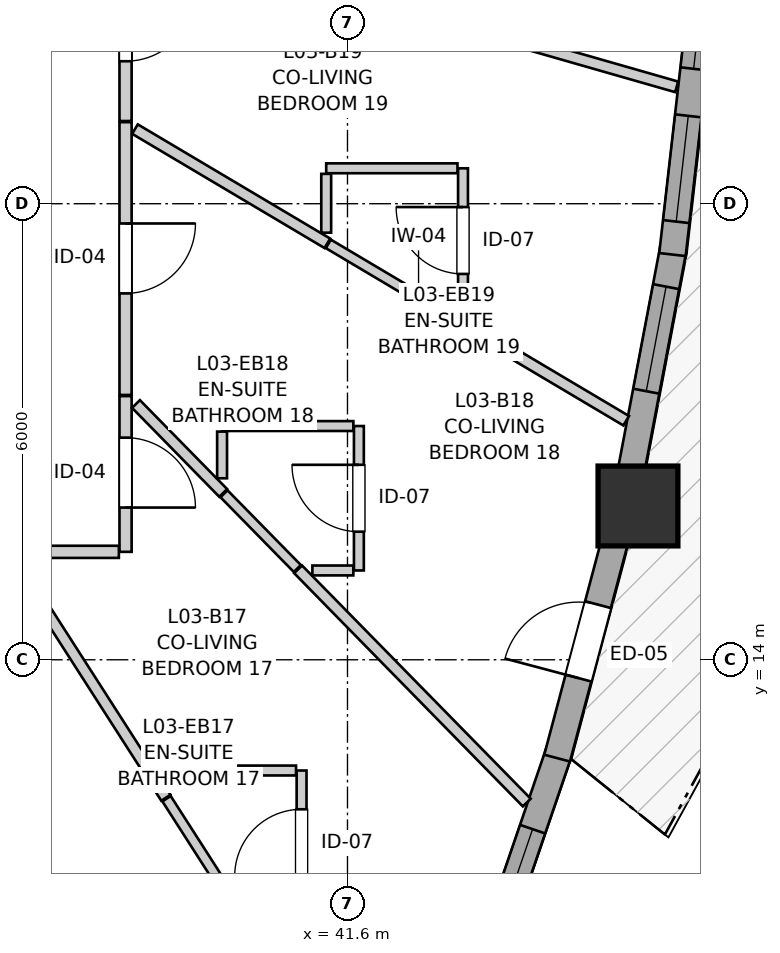
"""IFC4 building model, lengths in metres.
Left out: names, types, materials, properties, quantities, classifications, styles, units other than length and angle.
Written with IfcOpenShell. Run it as: python <this file> out.ifc"""

import sys

from ifc_helpers import new_model, si_unit, direction, frame, frame_2d, origin, origin_2d, place, context, subcontext, project, spatial, rectangle, extrude, source, transform, mapped, element, fill, save


model = new_model("IFC4")
c1 = context("Model", 3, precision=1e-05, world=origin(), true_north=direction((0.0, 1.0)))
c2 = subcontext(c1, "Body", "Model", "MODEL_VIEW")
j1 = project(units=[si_unit("LENGTHUNIT", "METRE"), si_unit("PLANEANGLEUNIT", "RADIAN")], contexts=[c1])
p1 = place(None, origin())
s1 = spatial("IfcSite", under=j1, at=p1, CompositionType="ELEMENT")
p2 = place(p1, origin())
s2 = spatial("IfcBuilding", under=s1, at=p2, CompositionType="ELEMENT")
p3 = place(p2, frame((0.0, 0.0, 14.2)))
s3 = spatial("IfcBuildingStorey", under=s2, at=p3, CompositionType="ELEMENT", Elevation=14.2)
m1 = source(origin(), c2, "Body", "SweptSolid", [
    extrude(rectangle(XDim=1.05, YDim=1.05, at=origin_2d()), origin(), (0.0, 0.0, 1.0), 2.94),
])
p4 = place(p3, frame((45.422, 16.023, 0.0), z_axis=(0.0, 0.0, 1.0), x_axis=(1.0, 0.0, 0.0)))
e1 = element("IfcColumn", 1, at=p4, inside=s3, PredefinedType="COLUMN", context=c2, shape_type="MappedRepresentation", body=[
    mapped(m1, transform((0.0, 0.0, 0.0), x_axis=(1.0, 0.0, 0.0), y_axis=(0.0, 1.0, 0.0), z_axis=(0.0, 0.0, 1.0), scale=1.0)),
])
p5 = place(p3, frame((43.241, 9.448, 0.0), z_axis=(0.0, 0.0, 1.0), x_axis=(0.323599751171, 0.946194060984, 0.0)))
e2 = element("IfcWall", 2, at=p5, inside=s3, PredefinedType="SOLIDWALL", context=c2, shape_type="SweptSolid", body=[
    extrude(rectangle(XDim=3.532, YDim=0.35, at=frame_2d((1.766, 0.0))), origin(), (0.0, 0.0, 1.0), 2.42),
])
p6 = place(p5, frame((0.356, 0.0, 0.82)))
e3 = element("IfcOpeningElement", 3, at=p6, cuts=e2, PredefinedType="OPENING", context=c2, shape_type="SweptSolid", body=[
    extrude(rectangle(XDim=2.1, YDim=1.4, at=frame_2d((1.05, 0.7))), frame((0.0, 0.185, 0.0), z_axis=(0.0, -1.0, 0.0), x_axis=(1.0, 0.0, 0.0)), (0.0, 0.0, 1.0), 0.37),
])
p7 = place(p3, frame((44.358, 12.706, 0.0), z_axis=(0.0, 0.0, 1.0), x_axis=(0.25708907847, 0.966387709841, 0.0)))
e4 = element("IfcWall", 4, at=p7, inside=s3, PredefinedType="SOLIDWALL", context=c2, shape_type="SweptSolid", body=[
    extrude(rectangle(XDim=3.179, YDim=0.35, at=frame_2d((1.59, 0.0))), origin(), (0.0, 0.0, 1.0), 2.42),
])
p8 = place(p7, frame((1.09, 0.0, 0.0)))
e5 = element("IfcOpeningElement", 5, at=p8, cuts=e4, PredefinedType="OPENING", context=c2, shape_type="SweptSolid", body=[
    extrude(rectangle(XDim=1.0, YDim=2.1, at=frame_2d((0.5, 1.05))), frame((0.0, 0.185, 0.0), z_axis=(0.0, -1.0, 0.0), x_axis=(1.0, 0.0, 0.0)), (0.0, 0.0, 1.0), 0.37),
])
p9 = place(p3, frame((45.306, 16.351, 0.0), z_axis=(0.0, 0.0, 1.0), x_axis=(0.186681017514, 0.982420580861, 0.0)))
e6 = element("IfcWall", 6, at=p9, inside=s3, PredefinedType="SOLIDWALL", context=c2, shape_type="SweptSolid", body=[
    extrude(rectangle(XDim=3.123, YDim=0.35, at=frame_2d((1.562, 0.0))), origin(), (0.0, 0.0, 1.0), 2.42),
])
p10 = place(p9, frame((1.204, 0.0, 0.82)))
e7 = element("IfcOpeningElement", 7, at=p10, cuts=e6, PredefinedType="OPENING", context=c2, shape_type="SweptSolid", body=[
    extrude(rectangle(XDim=1.4, YDim=1.35, at=frame_2d((0.7, 0.675))), frame((0.0, 0.185, 0.0), z_axis=(0.0, -1.0, 0.0), x_axis=(1.0, 0.0, 0.0)), (0.0, 0.0, 1.0), 0.37),
])
p11 = place(p3, frame((45.875, 19.331, 0.0), z_axis=(0.0, 0.0, 1.0), x_axis=(0.113329685842, 0.99355743785, 0.0)))
e8 = element("IfcWall", 8, at=p11, inside=s3, PredefinedType="SOLIDWALL", context=c2, shape_type="SweptSolid", body=[
    extrude(rectangle(XDim=3.365, YDim=0.35, at=frame_2d((1.683, 0.0))), origin(), (0.0, 0.0, 1.0), 2.42),
])
p12 = place(p11, frame((0.437, 0.0, 0.82)))
e9 = element("IfcOpeningElement", 9, at=p12, cuts=e8, PredefinedType="OPENING", context=c2, shape_type="SweptSolid", body=[
    extrude(rectangle(XDim=1.4, YDim=1.35, at=frame_2d((0.7, 0.675))), frame((0.0, 0.185, 0.0), z_axis=(0.0, -1.0, 0.0), x_axis=(1.0, 0.0, 0.0)), (0.0, 0.0, 1.0), 0.37),
])
p13 = place(p11, frame((2.459, 0.0, 0.82)))
e10 = element("IfcOpeningElement", 10, at=p13, cuts=e8, PredefinedType="OPENING", context=c2, shape_type="SweptSolid", body=[
    extrude(rectangle(XDim=0.58, YDim=1.35, at=frame_2d((0.29, 0.675))), frame((0.0, 0.185, 0.0), z_axis=(0.0, -1.0, 0.0), x_axis=(1.0, 0.0, 0.0)), (0.0, 0.0, 1.0), 0.37),
])
p14 = place(p3, frame((38.68, 21.073, 0.0), z_axis=(0.0, 0.0, 1.0), x_axis=(0.0, -1.0, 0.0)))
e11 = element("IfcWall", 11, at=p14, inside=s3, PredefinedType="PARTITIONING", context=c2, shape_type="SweptSolid", body=[
    extrude(rectangle(XDim=3.589, YDim=0.16, at=frame_2d((1.794, 0.0))), origin(), (0.0, 0.0, 1.0), 2.94),
])
p15 = place(p14, frame((1.333, 0.0, 0.0)))
e12 = element("IfcOpeningElement", 12, at=p15, cuts=e11, PredefinedType="OPENING", context=c2, shape_type="SweptSolid", body=[
    extrude(rectangle(XDim=0.92, YDim=2.1, at=frame_2d((0.46, 1.05))), frame((0.0, 0.09, 0.0), z_axis=(0.0, -1.0, 0.0), x_axis=(1.0, 0.0, 0.0)), (0.0, 0.0, 1.0), 0.18),
])
p16 = place(p3, frame((38.68, 23.63, 0.0), z_axis=(0.0, 0.0, 1.0), x_axis=(0.0, -1.0, 0.0)))
e13 = element("IfcWall", 13, at=p16, inside=s3, PredefinedType="PARTITIONING", context=c2, shape_type="SweptSolid", body=[
    extrude(rectangle(XDim=2.542, YDim=0.16, at=frame_2d((1.271, 0.0))), origin(), (0.0, 0.0, 1.0), 2.94),
])
p17 = place(p16, frame((0.835, 0.0, 0.0)))
e14 = element("IfcOpeningElement", 14, at=p17, cuts=e13, PredefinedType="OPENING", context=c2, shape_type="SweptSolid", body=[
    extrude(rectangle(XDim=0.92, YDim=2.1, at=frame_2d((0.46, 1.05))), frame((0.0, 0.09, 0.0), z_axis=(0.0, -1.0, 0.0), x_axis=(1.0, 0.0, 0.0)), (0.0, 0.0, 1.0), 0.18),
])
p18 = place(p3, frame((38.68, 17.469, 0.0), z_axis=(0.0, 0.0, 1.0), x_axis=(0.0, -1.0, 0.0)))
e15 = element("IfcWall", 15, at=p18, inside=s3, PredefinedType="PARTITIONING", context=c2, shape_type="SweptSolid", body=[
    extrude(rectangle(XDim=2.049, YDim=0.16, at=frame_2d((1.024, 0.0))), origin(), (0.0, 0.0, 1.0), 2.94),
])
p19 = place(p18, frame((0.546, 0.0, 0.0)))
e16 = element("IfcOpeningElement", 16, at=p19, cuts=e15, PredefinedType="OPENING", context=c2, shape_type="SweptSolid", body=[
    extrude(rectangle(XDim=0.92, YDim=2.1, at=frame_2d((0.46, 1.05))), frame((0.0, 0.09, 0.0), z_axis=(0.0, -1.0, 0.0), x_axis=(1.0, 0.0, 0.0)), (0.0, 0.0, 1.0), 0.18),
])
p20 = place(p3, frame((43.12, 18.566, 0.0), z_axis=(0.0, 0.0, 1.0), x_axis=(0.0, 1.0, 0.0)))
e17 = element("IfcWall", 17, at=p20, inside=s3, PredefinedType="PARTITIONING", context=c2, shape_type="SweptSolid", body=[
    extrude(rectangle(XDim=1.9, YDim=0.13, at=frame_2d((0.95, 0.0))), origin(), (0.0, 0.0, 1.0), 2.94),
])
p21 = place(p20, frame((0.51, 0.0, 0.0)))
e18 = element("IfcOpeningElement", 18, at=p21, cuts=e17, PredefinedType="OPENING", context=c2, shape_type="SweptSolid", body=[
    extrude(rectangle(XDim=0.88, YDim=2.05, at=frame_2d((0.44, 1.025))), frame((0.0, 0.075, 0.0), z_axis=(0.0, -1.0, 0.0), x_axis=(1.0, 0.0, 0.0)), (0.0, 0.0, 1.0), 0.15),
])
p22 = place(p3, frame((40.996, 10.643, 0.0), z_axis=(0.0, 0.0, 1.0), x_axis=(0.0, 1.0, 0.0)))
e19 = element("IfcWall", 19, at=p22, inside=s3, PredefinedType="PARTITIONING", context=c2, shape_type="SweptSolid", body=[
    extrude(rectangle(XDim=1.9, YDim=0.13, at=frame_2d((0.95, 0.0))), origin(), (0.0, 0.0, 1.0), 2.94),
])
p23 = place(p22, frame((0.51, 0.0, 0.0)))
e20 = element("IfcOpeningElement", 20, at=p23, cuts=e19, PredefinedType="OPENING", context=c2, shape_type="SweptSolid", body=[
    extrude(rectangle(XDim=0.88, YDim=2.05, at=frame_2d((0.44, 1.025))), frame((0.0, 0.075, 0.0), z_axis=(0.0, -1.0, 0.0), x_axis=(1.0, 0.0, 0.0)), (0.0, 0.0, 1.0), 0.15),
])
p24 = place(p3, frame((41.75, 15.175, 0.0), z_axis=(0.0, 0.0, 1.0), x_axis=(0.0, 1.0, 0.0)))
e21 = element("IfcWall", 21, at=p24, inside=s3, PredefinedType="PARTITIONING", context=c2, shape_type="SweptSolid", body=[
    extrude(rectangle(XDim=1.9, YDim=0.13, at=frame_2d((0.95, 0.0))), origin(), (0.0, 0.0, 1.0), 2.94),
])
p25 = place(p24, frame((0.51, 0.0, 0.0)))
e22 = element("IfcOpeningElement", 22, at=p25, cuts=e21, PredefinedType="OPENING", context=c2, shape_type="SweptSolid", body=[
    extrude(rectangle(XDim=0.88, YDim=2.05, at=frame_2d((0.44, 1.025))), frame((0.0, 0.075, 0.0), z_axis=(0.0, -1.0, 0.0), x_axis=(1.0, 0.0, 0.0)), (0.0, 0.0, 1.0), 0.15),
])
p26 = place(p3, frame((40.95, 15.19, 0.0), z_axis=(0.0, 0.0, 1.0), x_axis=(0.700142401903, -0.714003233226, 0.0)))
e23 = element("IfcWall", 23, at=p26, inside=s3, PredefinedType="PARTITIONING", context=c2, shape_type="SweptSolid", body=[
    extrude(rectangle(XDim=4.298, YDim=0.145, at=frame_2d((2.149, 0.0))), origin(), (0.0, 0.0, 1.0), 2.94),
])
p27 = place(p3, frame((37.217, 15.294, 0.0), z_axis=(0.0, 0.0, 1.0), x_axis=(0.539878709929, -0.841742822105, 0.0)))
e24 = element("IfcWall", 24, at=p27, inside=s3, PredefinedType="PARTITIONING", context=c2, shape_type="SweptSolid", body=[
    extrude(rectangle(XDim=3.694, YDim=0.145, at=frame_2d((1.847, 0.0))), origin(), (0.0, 0.0, 1.0), 2.94),
])
p28 = place(p3, frame((38.804, 20.981, 0.0), z_axis=(0.0, 0.0, 1.0), x_axis=(0.859905944731, -0.510452511225, 0.0)))
e25 = element("IfcWall", 25, at=p28, inside=s3, PredefinedType="PARTITIONING", context=c2, shape_type="SweptSolid", body=[
    extrude(rectangle(XDim=2.943, YDim=0.145, at=frame_2d((1.472, 0.0))), origin(), (0.0, 0.0, 1.0), 2.94),
])
p29 = place(p3, frame((43.055, 22.361, 0.0), z_axis=(0.0, 0.0, 1.0), x_axis=(0.961351316588, -0.275324619486, 0.0)))
e26 = element("IfcWall", 26, at=p29, inside=s3, PredefinedType="PARTITIONING", context=c2, shape_type="SweptSolid", body=[
    extrude(rectangle(XDim=2.992, YDim=0.145, at=frame_2d((1.496, 0.0))), origin(), (0.0, 0.0, 1.0), 2.94),
])
p30 = place(p3, frame((42.848, 18.581, 0.0), z_axis=(0.0, 0.0, 1.0), x_axis=(0.859872599939, -0.510508679528, 0.0)))
e27 = element("IfcWall", 27, at=p30, inside=s3, PredefinedType="PARTITIONING", context=c2, shape_type="SweptSolid", body=[
    extrude(rectangle(XDim=2.813, YDim=0.145, at=frame_2d((1.407, 0.0))), origin(), (0.0, 0.0, 1.0), 2.94),
])
p31 = place(p3, frame((38.817, 17.365, 0.0), z_axis=(0.0, 0.0, 1.0), x_axis=(0.70029627305, -0.713852316626, 0.0)))
e28 = element("IfcWall", 28, at=p31, inside=s3, PredefinedType="PARTITIONING", context=c2, shape_type="SweptSolid", body=[
    extrude(rectangle(XDim=1.639, YDim=0.145, at=frame_2d((0.819, 0.0))), origin(), (0.0, 0.0, 1.0), 2.94),
])
for number, where, z_axis, x_axis in (
    (29, (39.196, 12.543, 0.0), (0.0, 0.0, 1.0), (1.0, 0.0, 0.0)),
    (30, (39.95, 17.075, 0.0), (0.0, 0.0, 1.0), (1.0, 0.0, 0.0)),
    (31, (41.32, 20.466, 0.0), (0.0, 0.0, 1.0), (1.0, 0.0, 0.0)),
):
    element("IfcWall", number, at=place(p3, frame(where, z_axis=z_axis, x_axis=x_axis)), inside=s3, PredefinedType="PARTITIONING", context=c2, shape_type="SweptSolid", body=[
        extrude(rectangle(XDim=1.727, YDim=0.13, at=frame_2d((0.864, 0.0))), origin(), (0.0, 0.0, 1.0), 2.94),
    ])
p32 = place(p3, frame((39.219, 12.172, 0.0), z_axis=(0.0, 0.0, 1.0), x_axis=(0.539899826285, -0.84172927808, 0.0)))
e32 = element("IfcWall", 32, at=p32, inside=s3, PredefinedType="PARTITIONING", context=c2, shape_type="SweptSolid", body=[
    extrude(rectangle(XDim=1.784, YDim=0.13, at=frame_2d((0.892, 0.0))), origin(), (0.0, 0.0, 1.0), 2.94),
])
p33 = place(p3, frame((41.348, 19.471, 0.0), z_axis=(0.0, 0.0, 1.0), x_axis=(0.859825694404, -0.510587676352, 0.0)))
e33 = element("IfcWall", 33, at=p33, inside=s3, PredefinedType="PARTITIONING", context=c2, shape_type="SweptSolid", body=[
    extrude(rectangle(XDim=1.729, YDim=0.13, at=frame_2d((0.865, 0.0))), origin(), (0.0, 0.0, 1.0), 2.94),
])
p34 = place(p3, frame((37.314, 15.42, 0.0), z_axis=(0.0, 0.0, 1.0), x_axis=(1.0, 0.0, 0.0)))
e34 = element("IfcWall", 34, at=p34, inside=s3, PredefinedType="PARTITIONING", context=c2, shape_type="SweptSolid", body=[
    extrude(rectangle(XDim=1.278, YDim=0.16, at=frame_2d((0.639, 0.0))), origin(), (0.0, 0.0, 1.0), 2.94),
])
p35 = place(p3, frame((39.975, 16.184, 0.0), z_axis=(0.0, 0.0, 1.0), x_axis=(0.700338966049, -0.713810431861, 0.0)))
e35 = element("IfcWall", 35, at=p35, inside=s3, PredefinedType="PARTITIONING", context=c2, shape_type="SweptSolid", body=[
    extrude(rectangle(XDim=1.377, YDim=0.13, at=frame_2d((0.689, 0.0))), origin(), (0.0, 0.0, 1.0), 2.94),
])
p36 = place(p3, frame((41.32, 19.619, 0.0), z_axis=(0.0, 0.0, 1.0), x_axis=(0.0, 1.0, 0.0)))
e36 = element("IfcWall", 36, at=p36, inside=s3, PredefinedType="PARTITIONING", context=c2, shape_type="SweptSolid", body=[
    extrude(rectangle(XDim=0.774, YDim=0.13, at=frame_2d((0.387, 0.0))), origin(), (0.0, 0.0, 1.0), 2.94),
])
p37 = place(p3, frame((39.95, 16.388, 0.0), z_axis=(0.0, 0.0, 1.0), x_axis=(0.0, 1.0, 0.0)))
e37 = element("IfcWall", 37, at=p37, inside=s3, PredefinedType="PARTITIONING", context=c2, shape_type="SweptSolid", body=[
    extrude(rectangle(XDim=0.614, YDim=0.13, at=frame_2d((0.307, 0.0))), origin(), (0.0, 0.0, 1.0), 2.94),
])
p38 = place(p3, frame((41.138, 15.175, 0.0), z_axis=(0.0, 0.0, 1.0), x_axis=(1.0, 0.0, 0.0)))
e38 = element("IfcWall", 38, at=p38, inside=s3, PredefinedType="PARTITIONING", context=c2, shape_type="SweptSolid", body=[
    extrude(rectangle(XDim=0.539, YDim=0.13, at=frame_2d((0.27, 0.0))), origin(), (0.0, 0.0, 1.0), 2.94),
])
m2 = source(origin(), c2, "Body", "SweptSolid", [
    extrude(rectangle(XDim=2.1, YDim=1.4, at=frame_2d((1.05, 0.7))), frame((0.0, 0.03, 0.0), z_axis=(0.0, -1.0, 0.0), x_axis=(1.0, 0.0, 0.0)), (0.0, 0.0, 1.0), 0.06),
])
p39 = place(p6, origin())
e39 = element("IfcWindow", 39, at=p39, inside=s3, PartitioningType="SINGLE_PANEL", PredefinedType="WINDOW", context=c2, shape_type="MappedRepresentation", body=[
    mapped(m2, transform((0.0, 0.0, 0.0), x_axis=(1.0, 0.0, 0.0), y_axis=(0.0, 1.0, 0.0), z_axis=(0.0, 0.0, 1.0), scale=1.0)),
])
fill(e3, e39)
m3 = source(origin(), c2, "Body", "SweptSolid", [
    extrude(rectangle(XDim=1.4, YDim=1.35, at=frame_2d((0.7, 0.675))), frame((0.0, 0.03, 0.0), z_axis=(0.0, -1.0, 0.0), x_axis=(1.0, 0.0, 0.0)), (0.0, 0.0, 1.0), 0.06),
])
p40 = place(p10, origin())
e40 = element("IfcWindow", 40, at=p40, inside=s3, PartitioningType="SINGLE_PANEL", PredefinedType="WINDOW", context=c2, shape_type="MappedRepresentation", body=[
    mapped(m3, transform((0.0, 0.0, 0.0), x_axis=(1.0, 0.0, 0.0), y_axis=(0.0, 1.0, 0.0), z_axis=(0.0, 0.0, 1.0), scale=1.0)),
])
fill(e7, e40)
p41 = place(p12, origin())
e41 = element("IfcWindow", 41, at=p41, inside=s3, PartitioningType="SINGLE_PANEL", PredefinedType="WINDOW", context=c2, shape_type="MappedRepresentation", body=[
    mapped(m3, transform((0.0, 0.0, 0.0), x_axis=(1.0, 0.0, 0.0), y_axis=(0.0, 1.0, 0.0), z_axis=(0.0, 0.0, 1.0), scale=1.0)),
])
fill(e9, e41)
m4 = source(origin(), c2, "Body", "SweptSolid", [
    extrude(rectangle(XDim=0.58, YDim=1.35, at=frame_2d((0.29, 0.675))), frame((0.0, 0.03, 0.0), z_axis=(0.0, -1.0, 0.0), x_axis=(1.0, 0.0, 0.0)), (0.0, 0.0, 1.0), 0.06),
])
p42 = place(p13, origin())
e42 = element("IfcWindow", 42, at=p42, inside=s3, PartitioningType="SINGLE_PANEL", PredefinedType="WINDOW", context=c2, shape_type="MappedRepresentation", body=[
    mapped(m4, transform((0.0, 0.0, 0.0), x_axis=(1.0, 0.0, 0.0), y_axis=(0.0, 1.0, 0.0), z_axis=(0.0, 0.0, 1.0), scale=1.0)),
])
fill(e10, e42)
m5 = source(origin(), c2, "Body", "SweptSolid", [
    extrude(rectangle(XDim=1.0, YDim=2.1, at=frame_2d((0.5, 1.05))), frame((0.0, 0.025, 0.0), z_axis=(0.0, -1.0, 0.0), x_axis=(1.0, 0.0, 0.0)), (0.0, 0.0, 1.0), 0.05),
])
p43 = place(p8, origin())
e43 = element("IfcDoor", 43, at=p43, inside=s3, OperationType="SINGLE_SWING_LEFT", PredefinedType="DOOR", context=c2, shape_type="MappedRepresentation", body=[
    mapped(m5, transform((0.0, 0.0, 0.0), x_axis=(1.0, 0.0, 0.0), y_axis=(0.0, 1.0, 0.0), z_axis=(0.0, 0.0, 1.0), scale=1.0)),
])
fill(e5, e43)
m6 = source(origin(), c2, "Body", "SweptSolid", [
    extrude(rectangle(XDim=0.92, YDim=2.1, at=frame_2d((0.46, 1.05))), frame((0.0, 0.025, 0.0), z_axis=(0.0, -1.0, 0.0), x_axis=(1.0, 0.0, 0.0)), (0.0, 0.0, 1.0), 0.05),
])
p44 = place(p15, origin())
e44 = element("IfcDoor", 44, at=p44, inside=s3, OperationType="SINGLE_SWING_LEFT", PredefinedType="DOOR", context=c2, shape_type="MappedRepresentation", body=[
    mapped(m6, transform((0.0, 0.0, 0.0), x_axis=(1.0, 0.0, 0.0), y_axis=(0.0, 1.0, 0.0), z_axis=(0.0, 0.0, 1.0), scale=1.0)),
])
fill(e12, e44)
p45 = place(p17, origin())
e45 = element("IfcDoor", 45, at=p45, inside=s3, OperationType="SINGLE_SWING_LEFT", PredefinedType="DOOR", context=c2, shape_type="MappedRepresentation", body=[
    mapped(m6, transform((0.0, 0.0, 0.0), x_axis=(1.0, 0.0, 0.0), y_axis=(0.0, 1.0, 0.0), z_axis=(0.0, 0.0, 1.0), scale=1.0)),
])
fill(e14, e45)
p46 = place(p19, origin())
e46 = element("IfcDoor", 46, at=p46, inside=s3, OperationType="SINGLE_SWING_RIGHT", PredefinedType="DOOR", context=c2, shape_type="MappedRepresentation", body=[
    mapped(m6, transform((0.0, 0.0, 0.0), x_axis=(1.0, 0.0, 0.0), y_axis=(0.0, 1.0, 0.0), z_axis=(0.0, 0.0, 1.0), scale=1.0)),
])
fill(e16, e46)
m7 = source(origin(), c2, "Body", "SweptSolid", [
    extrude(rectangle(XDim=0.88, YDim=2.05, at=frame_2d((0.44, 1.025))), frame((0.0, 0.025, 0.0), z_axis=(0.0, -1.0, 0.0), x_axis=(1.0, 0.0, 0.0)), (0.0, 0.0, 1.0), 0.05),
])
p47 = place(p21, origin())
e47 = element("IfcDoor", 47, at=p47, inside=s3, OperationType="SINGLE_SWING_RIGHT", PredefinedType="DOOR", context=c2, shape_type="MappedRepresentation", body=[
    mapped(m7, transform((0.0, 0.0, 0.0), x_axis=(1.0, 0.0, 0.0), y_axis=(0.0, 1.0, 0.0), z_axis=(0.0, 0.0, 1.0), scale=1.0)),
])
fill(e18, e47)
p48 = place(p23, origin())
e48 = element("IfcDoor", 48, at=p48, inside=s3, OperationType="SINGLE_SWING_LEFT", PredefinedType="DOOR", context=c2, shape_type="MappedRepresentation", body=[
    mapped(m7, transform((0.0, 0.0, 0.0), x_axis=(1.0, 0.0, 0.0), y_axis=(0.0, 1.0, 0.0), z_axis=(0.0, 0.0, 1.0), scale=1.0)),
])
fill(e20, e48)
p49 = place(p25, origin())
e49 = element("IfcDoor", 49, at=p49, inside=s3, OperationType="SINGLE_SWING_RIGHT", PredefinedType="DOOR", context=c2, shape_type="MappedRepresentation", body=[
    mapped(m7, transform((0.0, 0.0, 0.0), x_axis=(1.0, 0.0, 0.0), y_axis=(0.0, 1.0, 0.0), z_axis=(0.0, 0.0, 1.0), scale=1.0)),
])
fill(e22, e49)
save(model, sys.argv[1])
